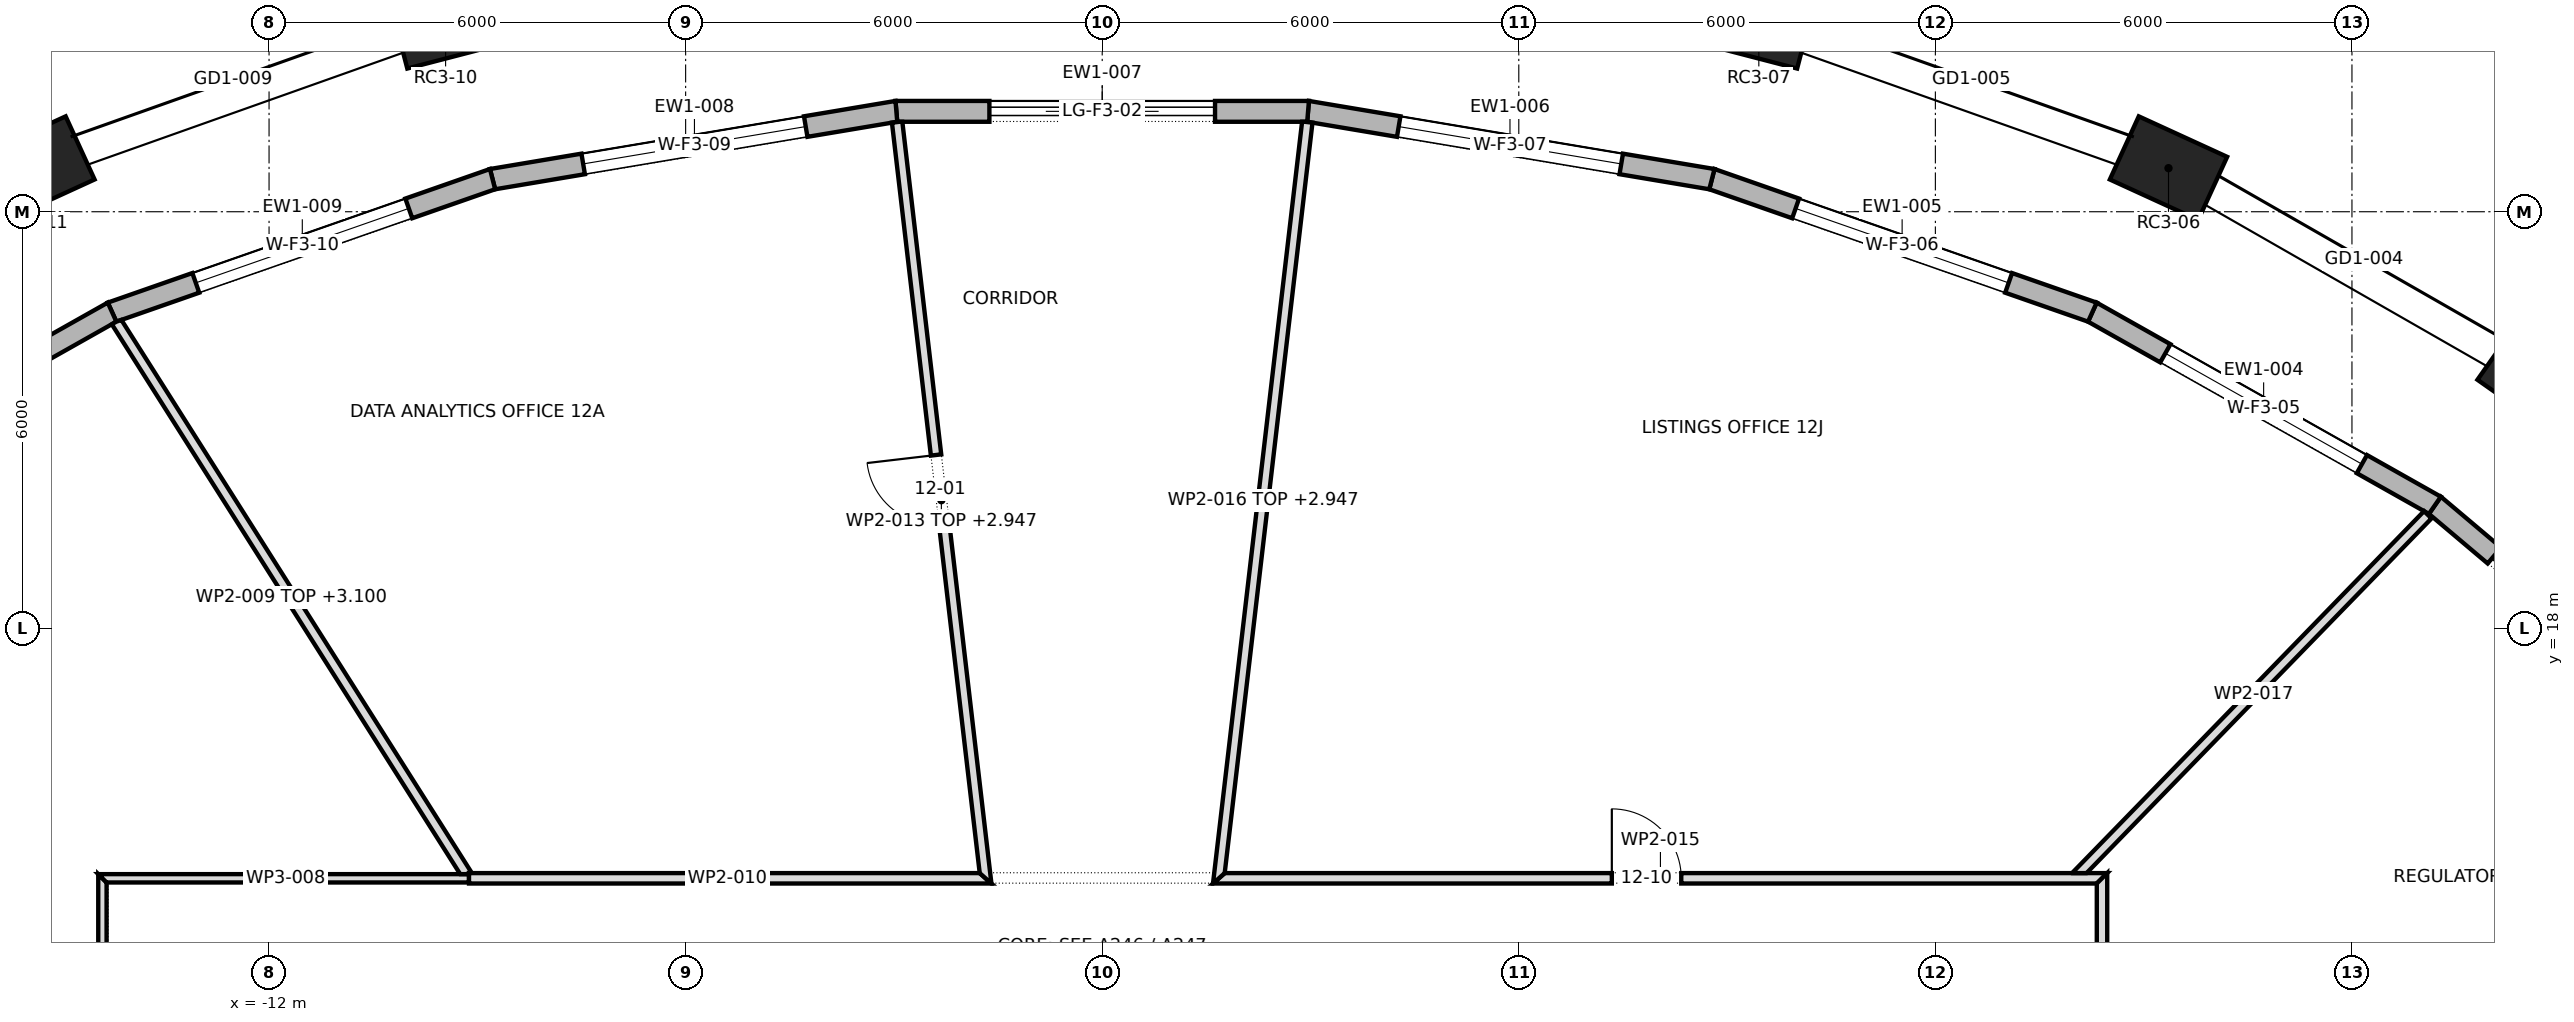
"""IFC4 building model, lengths in metres.
Left out: names, types, materials, properties, quantities, classifications, styles, units other than length and angle.
Written with IfcOpenShell. Run it as: python <this file> out.ifc"""

import sys

from ifc_helpers import new_model, si_unit, direction, frame, frame_2d, origin, origin_2d, place, context, subcontext, project, spatial, polyline, rectangle, outline, extrude, element, fill, save


model = new_model("IFC4")
c1 = context("Model", 3, precision=1e-05, world=origin(), true_north=direction((0.0, 1.0)))
c2 = subcontext(c1, "Body", "Model", "MODEL_VIEW")
j1 = project(units=[si_unit("LENGTHUNIT", "METRE"), si_unit("PLANEANGLEUNIT", "RADIAN")], contexts=[c1])
p1 = place(None, origin())
s1 = spatial("IfcSite", under=j1, at=p1, CompositionType="ELEMENT")
p2 = place(p1, origin())
s2 = spatial("IfcBuilding", under=s1, at=p2, CompositionType="ELEMENT")
p3 = place(p2, frame((0.0, 0.0, 186.9)))
s3 = spatial("IfcBuildingStorey", under=s2, at=p3, CompositionType="ELEMENT", Elevation=186.9)
for number, where, z_axis, x_axis in (
    (1, (20.668, 21.586, 0.0), (0.0, 0.0, 1.0), (-0.818, 0.575, 0.0)),
    (2, (15.358, 24.627, 0.0), (0.0, 0.0, 1.0), (-0.909, 0.417, 0.0)),
    (3, (9.457, 26.722, 0.0), (0.0, 0.0, 1.0), (-0.968, 0.252, 0.0)),
    (4, (-9.457, 26.722, 0.0), (0.0, 0.0, 1.0), (-0.968, -0.252, 0.0)),
    (5, (-15.358, 24.627, 0.0), (0.0, 0.0, 1.0), (-0.909, -0.417, 0.0)),
):
    element("IfcColumn", number, at=place(p3, frame(where, z_axis=z_axis, x_axis=x_axis)), inside=s3, PredefinedType="COLUMN", context=c2, shape_type="SweptSolid", body=[
        extrude(rectangle(XDim=1.4, YDim=1.0, at=origin_2d()), origin(), (0.0, 0.0, 1.0), 4.0),
    ])
p4 = place(p3, frame((23.392, 16.23, 0.0), z_axis=(0.0, 0.0, 1.0), x_axis=(-0.764238764041, 0.64493341636, 0.0)))
e6 = element("IfcWall", 6, at=p4, inside=s3, PredefinedType="STANDARD", context=c2, shape_type="SweptSolid", body=[
    extrude(outline(polyline([(-0.015, -0.15), (5.507, -0.15), (5.478, 0.15), (0.015, 0.15), (-0.015, -0.15)])), origin(), (0.0, 0.0, 1.0), 3.7),
])
p5 = place(p4, frame((1.121, 0.0, 0.0)))
e7 = element("IfcOpeningElement", 7, at=p5, cuts=e6, PredefinedType="OPENING", context=c2, shape_type="SweptSolid", body=[
    extrude(rectangle(XDim=3.25, YDim=3.25, at=frame_2d((1.625, 1.625))), frame((0.0, 0.162, 0.0), z_axis=(0.0, -1.0, 0.0), x_axis=(1.0, 0.0, 0.0)), (0.0, 0.0, 1.0), 0.324),
])
p6 = place(p3, frame((19.195, 19.772, 0.0), z_axis=(0.0, 0.0, 1.0), x_axis=(-0.871077775545, 0.491145099691, 0.0)))
e8 = element("IfcWall", 8, at=p6, inside=s3, PredefinedType="STANDARD", context=c2, shape_type="SweptSolid", body=[
    extrude(outline(polyline([(-0.014, -0.15), (5.677, -0.15), (5.65, 0.15), (0.014, 0.15), (-0.014, -0.15)])), origin(), (0.0, 0.0, 1.0), 3.7),
])
p7 = place(p6, frame((1.207, 0.0, 0.6)))
e9 = element("IfcOpeningElement", 9, at=p7, cuts=e8, PredefinedType="OPENING", context=c2, shape_type="SweptSolid", body=[
    extrude(rectangle(XDim=3.25, YDim=2.65, at=frame_2d((1.625, 1.325))), frame((0.0, 0.162, 0.0), z_axis=(0.0, -1.0, 0.0), x_axis=(1.0, 0.0, 0.0)), (0.0, 0.0, 1.0), 0.324),
])
p8 = place(p3, frame((14.261, 22.554, 0.0), z_axis=(0.0, 0.0, 1.0), x_axis=(-0.943990724372, 0.329971987144, 0.0)))
e10 = element("IfcWall", 10, at=p8, inside=s3, PredefinedType="STANDARD", context=c2, shape_type="SweptSolid", body=[
    extrude(outline(polyline([(-0.013, -0.15), (5.818, -0.15), (5.792, 0.15), (0.013, 0.15), (-0.013, -0.15)])), origin(), (0.0, 0.0, 1.0), 3.7),
])
p9 = place(p8, frame((1.278, 0.0, 0.6)))
e11 = element("IfcOpeningElement", 11, at=p9, cuts=e10, PredefinedType="OPENING", context=c2, shape_type="SweptSolid", body=[
    extrude(rectangle(XDim=3.25, YDim=2.65, at=frame_2d((1.625, 1.325))), frame((0.0, 0.162, 0.0), z_axis=(0.0, -1.0, 0.0), x_axis=(1.0, 0.0, 0.0)), (0.0, 0.0, 1.0), 0.324),
])
p10 = place(p3, frame((8.781, 24.469, 0.0), z_axis=(0.0, 0.0, 1.0), x_axis=(-0.986201934369, 0.165546805001, 0.0)))
e12 = element("IfcWall", 12, at=p10, inside=s3, PredefinedType="STANDARD", context=c2, shape_type="SweptSolid", body=[
    extrude(outline(polyline([(-0.013, -0.15), (5.91, -0.15), (5.885, 0.15), (0.013, 0.15), (-0.013, -0.15)])), origin(), (0.0, 0.0, 1.0), 3.7),
])
p11 = place(p10, frame((1.324, 0.0, 0.6)))
e13 = element("IfcOpeningElement", 13, at=p11, cuts=e12, PredefinedType="OPENING", context=c2, shape_type="SweptSolid", body=[
    extrude(rectangle(XDim=3.25, YDim=2.65, at=frame_2d((1.625, 1.325))), frame((0.0, 0.162, 0.0), z_axis=(0.0, -1.0, 0.0), x_axis=(1.0, 0.0, 0.0)), (0.0, 0.0, 1.0), 0.324),
])
p12 = place(p3, frame((2.965, 25.446, 0.0), z_axis=(0.0, 0.0, 1.0), x_axis=(-1.0, 0.0, 0.0)))
e14 = element("IfcWall", 14, at=p12, inside=s3, PredefinedType="STANDARD", context=c2, shape_type="SweptSolid", body=[
    extrude(outline(polyline([(-0.012, -0.15), (5.942, -0.15), (5.917, 0.15), (0.012, 0.15), (-0.012, -0.15)])), origin(), (0.0, 0.0, 1.0), 3.7),
])
p13 = place(p12, frame((1.34, 0.0, 0.0)))
e15 = element("IfcOpeningElement", 15, at=p13, cuts=e14, PredefinedType="OPENING", context=c2, shape_type="SweptSolid", body=[
    extrude(rectangle(XDim=3.25, YDim=3.25, at=frame_2d((1.625, 1.625))), frame((0.0, 0.162, 0.0), z_axis=(0.0, -1.0, 0.0), x_axis=(1.0, 0.0, 0.0)), (0.0, 0.0, 1.0), 0.324),
])
p14 = place(p3, frame((-2.965, 25.446, 0.0), z_axis=(0.0, 0.0, 1.0), x_axis=(-0.986201934369, -0.165546805001, 0.0)))
e16 = element("IfcWall", 16, at=p14, inside=s3, PredefinedType="STANDARD", context=c2, shape_type="SweptSolid", body=[
    extrude(outline(polyline([(-0.012, -0.15), (5.91, -0.15), (5.885, 0.15), (0.012, 0.15), (-0.012, -0.15)])), origin(), (0.0, 0.0, 1.0), 3.7),
])
p15 = place(p14, frame((1.324, 0.0, 0.6)))
e17 = element("IfcOpeningElement", 17, at=p15, cuts=e16, PredefinedType="OPENING", context=c2, shape_type="SweptSolid", body=[
    extrude(rectangle(XDim=3.25, YDim=2.65, at=frame_2d((1.625, 1.325))), frame((0.0, 0.162, 0.0), z_axis=(0.0, -1.0, 0.0), x_axis=(1.0, 0.0, 0.0)), (0.0, 0.0, 1.0), 0.324),
])
p16 = place(p3, frame((-8.781, 24.469, 0.0), z_axis=(0.0, 0.0, 1.0), x_axis=(-0.943990724372, -0.329971987144, 0.0)))
e18 = element("IfcWall", 18, at=p16, inside=s3, PredefinedType="STANDARD", context=c2, shape_type="SweptSolid", body=[
    extrude(outline(polyline([(-0.013, -0.15), (5.819, -0.15), (5.792, 0.15), (0.013, 0.15), (-0.013, -0.15)])), origin(), (0.0, 0.0, 1.0), 3.7),
])
p17 = place(p16, frame((1.278, 0.0, 0.6)))
e19 = element("IfcOpeningElement", 19, at=p17, cuts=e18, PredefinedType="OPENING", context=c2, shape_type="SweptSolid", body=[
    extrude(rectangle(XDim=3.25, YDim=2.65, at=frame_2d((1.625, 1.325))), frame((0.0, 0.162, 0.0), z_axis=(0.0, -1.0, 0.0), x_axis=(1.0, 0.0, 0.0)), (0.0, 0.0, 1.0), 0.324),
])
p18 = place(p3, frame((-14.261, 22.554, 0.0), z_axis=(0.0, 0.0, 1.0), x_axis=(-0.871077775545, -0.491145099691, 0.0)))
e20 = element("IfcWall", 20, at=p18, inside=s3, PredefinedType="STANDARD", context=c2, shape_type="SweptSolid", body=[
    extrude(outline(polyline([(-0.013, -0.15), (5.678, -0.15), (5.65, 0.15), (0.013, 0.15), (-0.013, -0.15)])), origin(), (0.0, 0.0, 1.0), 3.7),
])
p19 = place(p18, frame((1.207, 0.0, 0.6)))
e21 = element("IfcOpeningElement", 21, at=p19, cuts=e20, PredefinedType="OPENING", context=c2, shape_type="SweptSolid", body=[
    extrude(rectangle(XDim=3.25, YDim=2.65, at=frame_2d((1.625, 1.325))), frame((0.0, 0.162, 0.0), z_axis=(0.0, -1.0, 0.0), x_axis=(1.0, 0.0, 0.0)), (0.0, 0.0, 1.0), 0.324),
])
p20 = place(p3, frame((-14.4, 6.5, 0.0), z_axis=(0.0, 0.0, 1.0), x_axis=(0.0, 1.0, 0.0)))
e22 = element("IfcWall", 22, at=p20, inside=s3, PredefinedType="PARTITIONING", context=c2, shape_type="SweptSolid", body=[
    extrude(outline(polyline([(0.0, -0.06), (1.96, -0.06), (3.92, -0.06), (5.88, -0.06), (7.84, -0.06), (7.96, 0.06), (5.97, 0.06), (3.98, 0.06), (1.99, 0.06), (0.0, 0.06), (0.0, -0.06)])), origin(), (0.0, 0.0, 1.0), 3.7),
])
p21 = place(p20, frame((3.45, 0.0, 0.0)))
e23 = element("IfcOpeningElement", 23, at=p21, cuts=e22, PredefinedType="OPENING", context=c2, shape_type="SweptSolid", body=[
    extrude(rectangle(XDim=1.0, YDim=2.1, at=frame_2d((0.5, 1.05))), frame((0.0, 0.072, 0.0), z_axis=(0.0, -1.0, 0.0), x_axis=(1.0, 0.0, 0.0)), (0.0, 0.0, 1.0), 0.144),
])
p22 = place(p3, frame((-14.46, 14.4, 0.0), z_axis=(0.0, 0.0, 1.0), x_axis=(1.0, 0.0, 0.0)))
e24 = element("IfcWall", 24, at=p22, inside=s3, PredefinedType="PARTITIONING", context=c2, shape_type="SweptSolid", body=[
    extrude(outline(polyline([(5.34, 0.06), (3.56, 0.06), (1.78, 0.06), (0.0, 0.06), (0.12, -0.06), (1.86, -0.06), (3.6, -0.06), (5.34, -0.06), (5.34, 0.06)])), origin(), (0.0, 0.0, 1.0), 3.7),
])
p23 = place(p3, frame((-9.142, 14.435, 0.0), z_axis=(0.0, 0.0, 1.0), x_axis=(-0.535245013247, 0.844696854377, 0.0)))
e25 = element("IfcWall", 25, at=p23, inside=s3, PredefinedType="PARTITIONING", context=c2, shape_type="SweptSolid", body=[
    extrude(outline(polyline([(0.0, -0.075), (1.886, -0.075), (3.773, -0.075), (5.659, -0.075), (7.545, -0.075), (9.432, -0.075), (9.449, -0.001), (9.452, 0.069), (9.452, 0.075), (7.577, 0.075), (5.702, 0.075), (3.827, 0.075), (1.952, 0.075), (0.077, 0.075), (0.009, -0.032), (0.022, -0.04), (0.0, -0.075), (0.0, -0.075)])), origin(), (0.0, 0.0, 1.0), 3.1),
])
p24 = place(p3, frame((-9.12, 14.4, 0.0), z_axis=(0.0, 0.0, 1.0), x_axis=(1.0, 0.0, 0.0)))
e26 = element("IfcWall", 26, at=p24, inside=s3, PredefinedType="PARTITIONING", context=c2, shape_type="SweptSolid", body=[
    extrude(outline(polyline([(7.524, -0.075), (7.524, -0.075), (7.356, 0.075), (5.517, 0.075), (3.678, 0.075), (1.839, 0.075), (0.0, 0.075), (0.0, -0.075), (1.881, -0.075), (3.762, -0.075), (5.643, -0.075), (7.524, -0.075)])), origin(), (0.0, 0.0, 1.0), 3.7),
])
p25 = place(p3, frame((-1.67, 14.316, 0.0), z_axis=(0.0, 0.0, 1.0), x_axis=(-0.116172056535, 0.993229104125, 0.0)))
e27 = element("IfcWall", 27, at=p25, inside=s3, PredefinedType="PARTITIONING", context=c2, shape_type="SweptSolid", body=[
    extrude(outline(polyline([(0.0, -0.075), (1.841, -0.075), (3.682, -0.075), (5.523, -0.075), (7.364, -0.075), (9.205, -0.075), (11.045, -0.075), (11.05, -0.037), (11.05, 0.075), (9.236, 0.075), (7.423, 0.075), (5.609, 0.075), (3.795, 0.075), (1.982, 0.075), (0.168, 0.075), (0.084, 0.0), (0.0, -0.075), (0.0, -0.075)])), origin(), (0.0, 0.0, 1.0), 2.947),
])
p26 = place(p25, frame((5.222, 0.0, 0.0)))
e28 = element("IfcOpeningElement", 28, at=p26, cuts=e27, PredefinedType="OPENING", context=c2, shape_type="SweptSolid", body=[
    extrude(rectangle(XDim=1.0, YDim=2.1, at=frame_2d((0.5, 1.05))), frame((0.0, 0.087, 0.0), z_axis=(0.0, -1.0, 0.0), x_axis=(1.0, 0.0, 0.0)), (0.0, 0.0, 1.0), 0.174),
])
p27 = place(p3, frame((1.596, 14.4, 0.0), z_axis=(0.0, 0.0, 1.0), x_axis=(1.0, 0.0, 0.0)))
e29 = element("IfcWall", 29, at=p27, inside=s3, PredefinedType="PARTITIONING", context=c2, shape_type="SweptSolid", body=[
    extrude(outline(polyline([(0.0, -0.075), (1.818, -0.075), (3.637, -0.075), (5.455, -0.075), (7.274, -0.075), (9.092, -0.075), (10.911, -0.075), (12.729, -0.075), (12.879, 0.075), (11.063, 0.075), (9.248, 0.075), (7.432, 0.075), (5.616, 0.075), (3.8, 0.075), (1.984, 0.075), (0.168, 0.075), (0.0, -0.075), (0.0, -0.075)])), origin(), (0.0, 0.0, 1.0), 3.7),
])
p28 = place(p27, frame((5.744, 0.0, 0.0)))
e30 = element("IfcOpeningElement", 30, at=p28, cuts=e29, PredefinedType="OPENING", context=c2, shape_type="SweptSolid", body=[
    extrude(rectangle(XDim=1.0, YDim=2.1, at=frame_2d((0.5, 1.05))), frame((0.0, 0.087, 0.0), z_axis=(0.0, -1.0, 0.0), x_axis=(1.0, 0.0, 0.0)), (0.0, 0.0, 1.0), 0.174),
])
p29 = place(p3, frame((2.954, 25.292, 0.0), z_axis=(0.0, 0.0, 1.0), x_axis=(-0.116172056535, -0.993229104125, 0.0)))
e31 = element("IfcWall", 31, at=p29, inside=s3, PredefinedType="PARTITIONING", context=c2, shape_type="SweptSolid", body=[
    extrude(outline(polyline([(11.05, -0.075), (11.05, -0.075), (10.966, 0.0), (10.882, 0.075), (9.068, 0.075), (7.254, 0.075), (5.441, 0.075), (3.627, 0.075), (1.813, 0.075), (0.0, 0.075), (0.0, -0.036), (0.005, -0.075), (1.845, -0.075), (3.686, -0.075), (5.527, -0.075), (7.368, -0.075), (9.209, -0.075), (11.05, -0.075)])), origin(), (0.0, 0.0, 1.0), 2.947),
])
p30 = place(p3, frame((14.022, 14.423, 0.0), z_axis=(0.0, 0.0, 1.0), x_axis=(0.69721790069, 0.716859260216, 0.0)))
e32 = element("IfcWall", 32, at=p30, inside=s3, PredefinedType="PARTITIONING", context=c2, shape_type="SweptSolid", body=[
    extrude(outline(polyline([(0.0, 0.075), (0.0, 0.075), (0.146, -0.075), (1.927, -0.075), (3.708, -0.075), (5.49, -0.075), (7.271, -0.075), (7.271, 0.075), (5.454, 0.075), (3.636, 0.075), (1.818, 0.075), (0.0, 0.075)])), origin(), (0.0, 0.0, 1.0), 3.7),
])
p31 = place(p3, frame((14.4, 1.118, 0.0), z_axis=(0.0, 0.0, 1.0), x_axis=(0.0, 1.0, 0.0)))
e33 = element("IfcWall", 33, at=p31, inside=s3, PredefinedType="PARTITIONING", context=c2, shape_type="SweptSolid", body=[
    extrude(outline(polyline([(0.163, -0.075), (2.048, -0.075), (3.933, -0.075), (5.817, -0.075), (7.702, -0.075), (9.587, -0.075), (11.472, -0.075), (13.356, -0.075), (13.207, 0.075), (11.32, 0.075), (9.433, 0.075), (7.547, 0.075), (5.66, 0.075), (3.773, 0.075), (1.887, 0.075), (0.0, 0.075), (0.163, -0.075)])), origin(), (0.0, 0.0, 1.0), 3.7),
])
p32 = place(p31, frame((8.832, 0.0, 0.0)))
e34 = element("IfcOpeningElement", 34, at=p32, cuts=e33, PredefinedType="OPENING", context=c2, shape_type="SweptSolid", body=[
    extrude(rectangle(XDim=1.0, YDim=2.1, at=frame_2d((0.5, 1.05))), frame((0.0, 0.087, 0.0), z_axis=(0.0, -1.0, 0.0), x_axis=(1.0, 0.0, 0.0)), (0.0, 0.0, 1.0), 0.174),
])
p33 = place(p5, origin())
e35 = element("IfcDoor", 35, at=p33, inside=s3, OperationType="DOUBLE_DOOR_SLIDING", PredefinedType="DOOR", context=c2, shape_type="SweptSolid", body=[
    extrude(rectangle(XDim=3.25, YDim=3.25, at=frame_2d((1.625, 1.625))), frame((0.0, 0.025, 0.0), z_axis=(0.0, -1.0, 0.0), x_axis=(1.0, 0.0, 0.0)), (0.0, 0.0, 1.0), 0.05),
])
fill(e7, e35)
p34 = place(p7, origin())
e36 = element("IfcWindow", 36, at=p34, inside=s3, PartitioningType="TRIPLE_PANEL_VERTICAL", PredefinedType="WINDOW", context=c2, shape_type="SweptSolid", body=[
    extrude(rectangle(XDim=3.25, YDim=2.65, at=frame_2d((1.625, 1.325))), frame((0.0, 0.03, 0.0), z_axis=(0.0, -1.0, 0.0), x_axis=(1.0, 0.0, 0.0)), (0.0, 0.0, 1.0), 0.06),
])
fill(e9, e36)
p35 = place(p9, origin())
e37 = element("IfcWindow", 37, at=p35, inside=s3, PartitioningType="TRIPLE_PANEL_VERTICAL", PredefinedType="WINDOW", context=c2, shape_type="SweptSolid", body=[
    extrude(rectangle(XDim=3.25, YDim=2.65, at=frame_2d((1.625, 1.325))), frame((0.0, 0.03, 0.0), z_axis=(0.0, -1.0, 0.0), x_axis=(1.0, 0.0, 0.0)), (0.0, 0.0, 1.0), 0.06),
])
fill(e11, e37)
p36 = place(p11, origin())
e38 = element("IfcWindow", 38, at=p36, inside=s3, PartitioningType="TRIPLE_PANEL_VERTICAL", PredefinedType="WINDOW", context=c2, shape_type="SweptSolid", body=[
    extrude(rectangle(XDim=3.25, YDim=2.65, at=frame_2d((1.625, 1.325))), frame((0.0, 0.03, 0.0), z_axis=(0.0, -1.0, 0.0), x_axis=(1.0, 0.0, 0.0)), (0.0, 0.0, 1.0), 0.06),
])
fill(e13, e38)
p37 = place(p13, origin())
e39 = element("IfcDoor", 39, at=p37, inside=s3, OperationType="DOUBLE_DOOR_SLIDING", PredefinedType="DOOR", context=c2, shape_type="SweptSolid", body=[
    extrude(rectangle(XDim=3.25, YDim=3.25, at=frame_2d((1.625, 1.625))), frame((0.0, 0.025, 0.0), z_axis=(0.0, -1.0, 0.0), x_axis=(1.0, 0.0, 0.0)), (0.0, 0.0, 1.0), 0.05),
])
fill(e15, e39)
p38 = place(p15, origin())
e40 = element("IfcWindow", 40, at=p38, inside=s3, PartitioningType="TRIPLE_PANEL_VERTICAL", PredefinedType="WINDOW", context=c2, shape_type="SweptSolid", body=[
    extrude(rectangle(XDim=3.25, YDim=2.65, at=frame_2d((1.625, 1.325))), frame((0.0, 0.03, 0.0), z_axis=(0.0, -1.0, 0.0), x_axis=(1.0, 0.0, 0.0)), (0.0, 0.0, 1.0), 0.06),
])
fill(e17, e40)
p39 = place(p17, origin())
e41 = element("IfcWindow", 41, at=p39, inside=s3, PartitioningType="TRIPLE_PANEL_VERTICAL", PredefinedType="WINDOW", context=c2, shape_type="SweptSolid", body=[
    extrude(rectangle(XDim=3.25, YDim=2.65, at=frame_2d((1.625, 1.325))), frame((0.0, 0.03, 0.0), z_axis=(0.0, -1.0, 0.0), x_axis=(1.0, 0.0, 0.0)), (0.0, 0.0, 1.0), 0.06),
])
fill(e19, e41)
p40 = place(p26, origin())
e42 = element("IfcDoor", 42, at=p40, inside=s3, OperationType="SINGLE_SWING_LEFT", PredefinedType="DOOR", context=c2, shape_type="SweptSolid", body=[
    extrude(rectangle(XDim=1.0, YDim=2.1, at=frame_2d((0.5, 1.05))), frame((0.0, 0.025, 0.0), z_axis=(0.0, -1.0, 0.0), x_axis=(1.0, 0.0, 0.0)), (0.0, 0.0, 1.0), 0.05),
])
fill(e28, e42)
p41 = place(p28, origin())
e43 = element("IfcDoor", 43, at=p41, inside=s3, OperationType="SINGLE_SWING_RIGHT", PredefinedType="DOOR", context=c2, shape_type="SweptSolid", body=[
    extrude(rectangle(XDim=1.0, YDim=2.1, at=frame_2d((0.5, 1.05))), frame((0.0, 0.025, 0.0), z_axis=(0.0, -1.0, 0.0), x_axis=(1.0, 0.0, 0.0)), (0.0, 0.0, 1.0), 0.05),
])
fill(e30, e43)
save(model, sys.argv[1])
